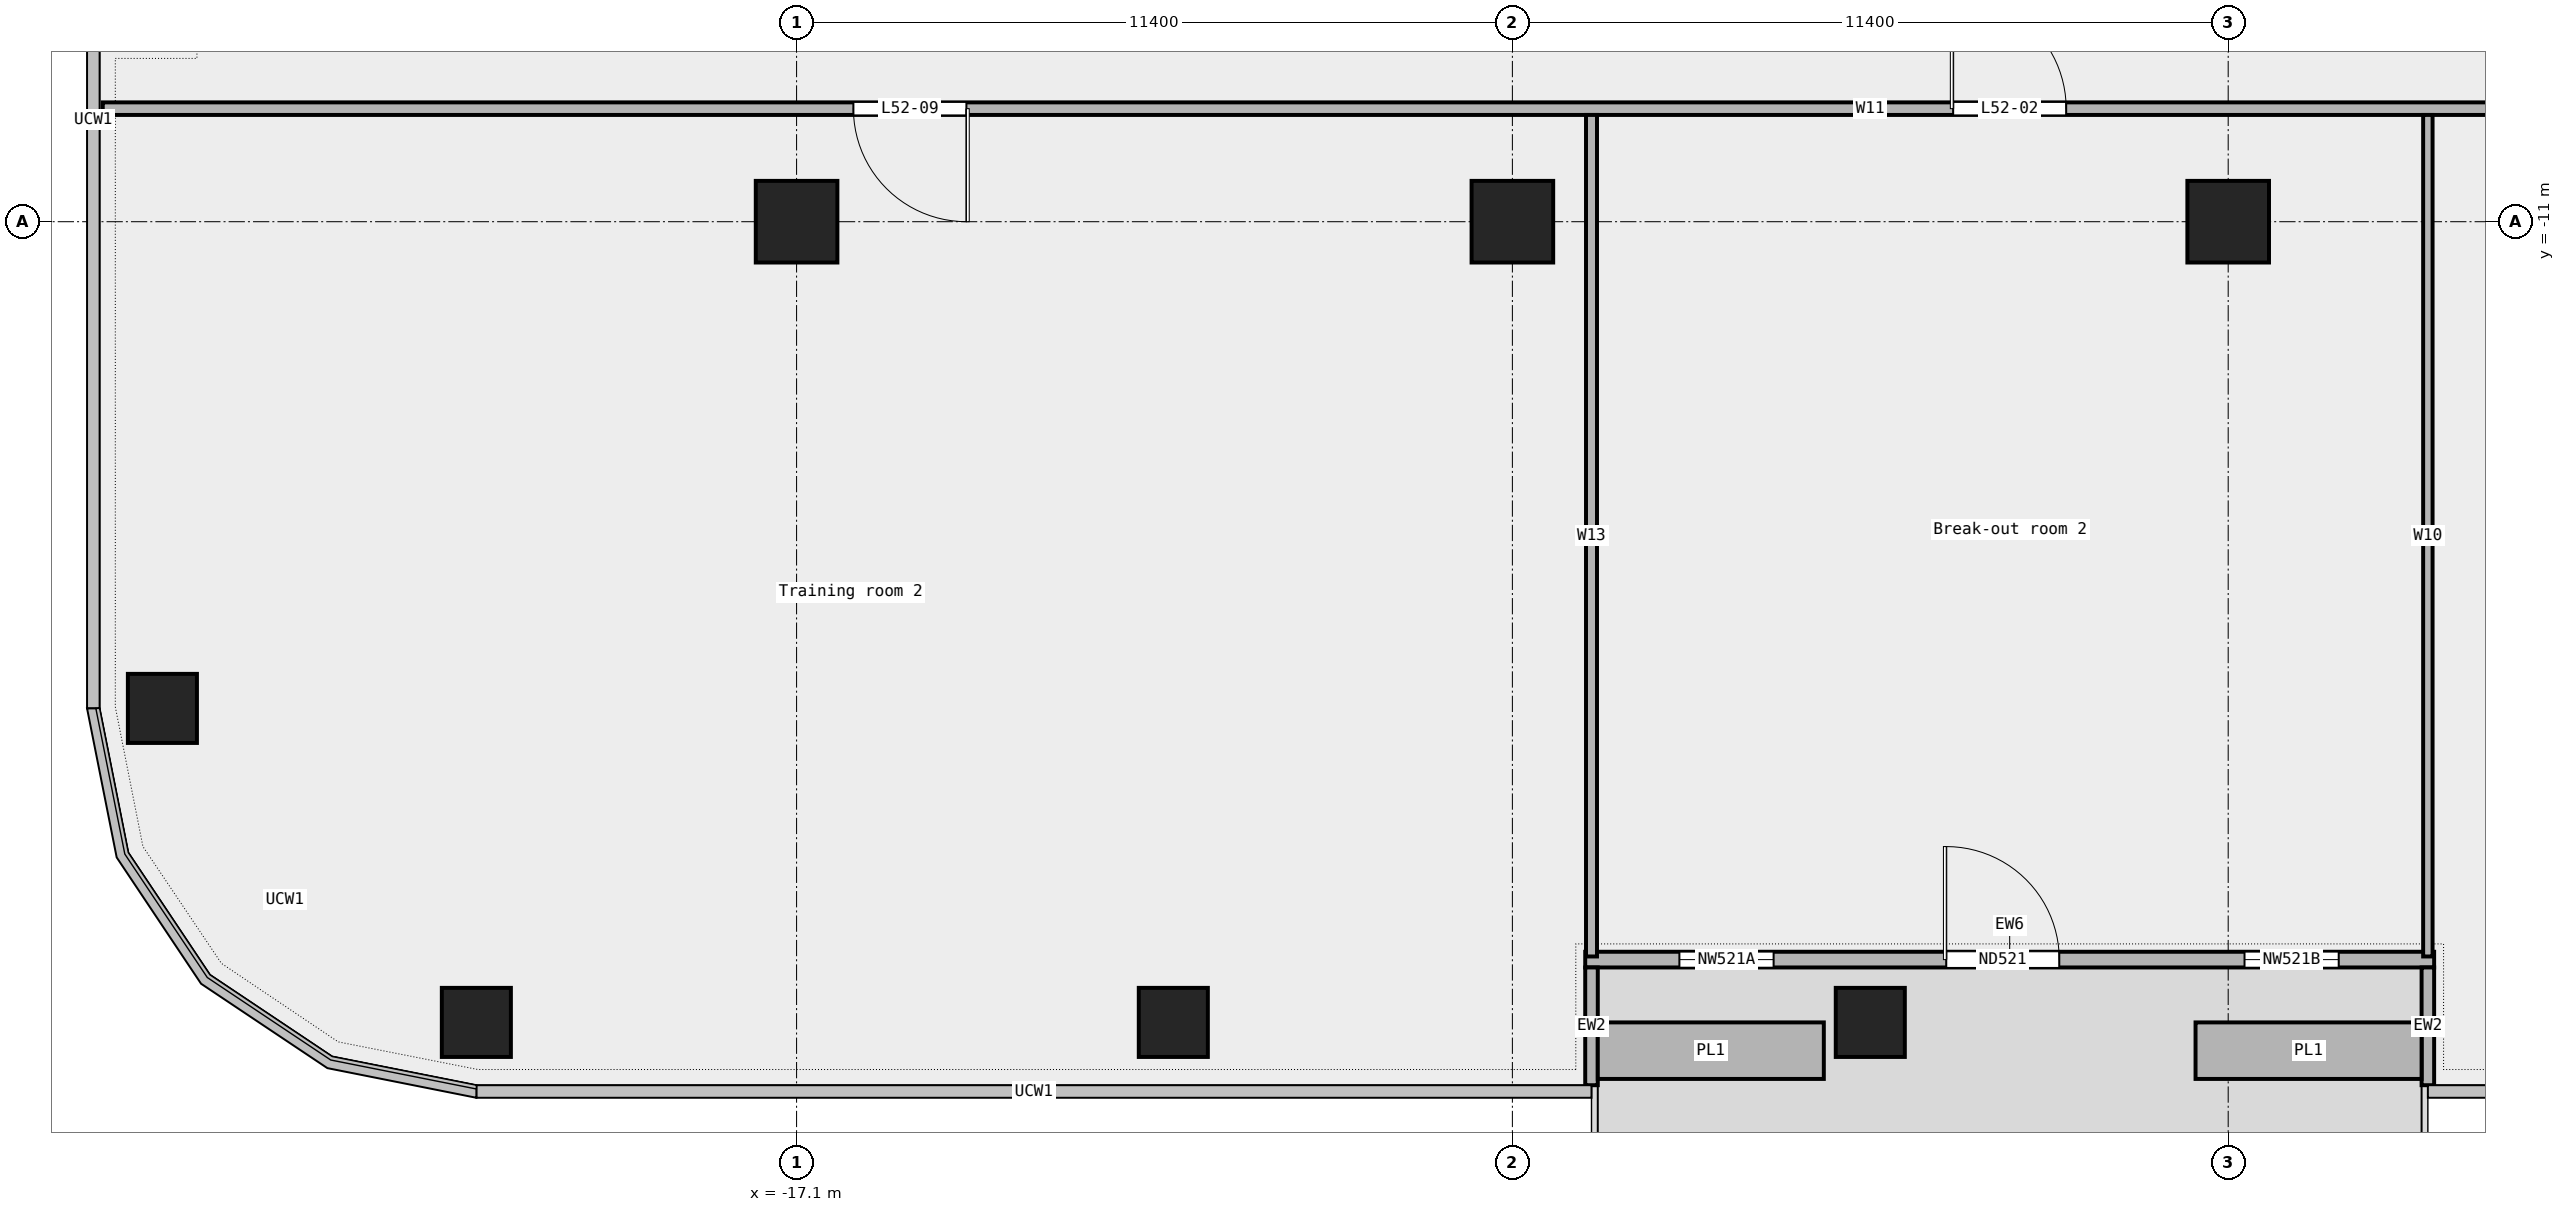
"""IFC4 building model, lengths in metres.
Left out: names, types, materials, properties, quantities, classifications, styles, units other than length and angle.
Written with IfcOpenShell. Run it as: python <this file> out.ifc"""

import sys

from ifc_helpers import new_model, si_unit, direction, frame, frame_2d, origin, origin_2d, place, context, subcontext, project, spatial, rectangle, extrude, element, fill, save


model = new_model("IFC4")
c1 = context("Model", 3, precision=1e-05, world=origin(), true_north=direction((0.0, 1.0)))
c2 = subcontext(c1, "Body", "Model", "MODEL_VIEW")
j1 = project(units=[si_unit("LENGTHUNIT", "METRE"), si_unit("PLANEANGLEUNIT", "RADIAN")], contexts=[c1])
p1 = place(None, origin())
s1 = spatial("IfcSite", under=j1, at=p1, CompositionType="ELEMENT")
p2 = place(p1, origin())
s2 = spatial("IfcBuilding", under=s1, at=p2, CompositionType="ELEMENT")
p3 = place(p2, frame((0.0, 0.0, 243.0)))
s3 = spatial("IfcBuildingStorey", under=s2, at=p3, CompositionType="ELEMENT", Elevation=243.0)
for number, where, z_axis, x_axis in (
    (1, (-22.2, -23.75, 0.0), (0.0, 0.0, 1.0), (1.0, 0.0, 0.0)),
    (2, (-11.1, -23.75, 0.0), (0.0, 0.0, 1.0), (1.0, 0.0, 0.0)),
    (3, (0.0, -23.75, 0.0), (0.0, 0.0, 1.0), (1.0, 0.0, 0.0)),
    (4, (-27.2, -18.75, 0.0), (0.0, 0.0, 1.0), (1.0, 0.0, 0.0)),
):
    element("IfcColumn", number, at=place(p3, frame(where, z_axis=z_axis, x_axis=x_axis)), inside=s3, PredefinedType="COLUMN", context=c2, shape_type="SweptSolid", body=[
        extrude(rectangle(XDim=1.1, YDim=1.1, at=origin_2d()), origin(), (0.0, 0.0, 1.0), 3.6),
    ])
for number, where, z_axis, x_axis in (
    (5, (-17.1, -11.0, 0.0), (0.0, 0.0, 1.0), (1.0, 0.0, 0.0)),
    (6, (-5.7, -11.0, 0.0), (0.0, 0.0, 1.0), (1.0, 0.0, 0.0)),
    (7, (5.7, -11.0, 0.0), (0.0, 0.0, 1.0), (1.0, 0.0, 0.0)),
):
    element("IfcColumn", number, at=place(p3, frame(where, z_axis=z_axis, x_axis=x_axis)), inside=s3, PredefinedType="COLUMN", context=c2, shape_type="SweptSolid", body=[
        extrude(rectangle(XDim=1.3, YDim=1.3, at=origin_2d()), origin(), (0.0, 0.0, 1.0), 3.6),
    ])
p4 = place(p3, frame((-4.54, -22.75, 0.0), z_axis=(0.0, 0.0, 1.0), x_axis=(1.0, 0.0, 0.0)))
e8 = element("IfcWall", 8, at=p4, inside=s3, PredefinedType="STANDARD", context=c2, shape_type="SweptSolid", body=[
    extrude(rectangle(XDim=13.52, YDim=0.25, at=frame_2d((6.76, 0.0))), origin(), (0.0, 0.0, 1.0), 3.6),
])
p5 = place(p4, frame((1.5, 0.0, 0.45)))
e9 = element("IfcOpeningElement", 9, at=p5, cuts=e8, PredefinedType="OPENING", context=c2, shape_type="SweptSolid", body=[
    extrude(rectangle(XDim=1.5, YDim=2.4, at=frame_2d((0.75, 1.2))), frame((0.0, 0.137, 0.0), z_axis=(0.0, -1.0, 0.0), x_axis=(1.0, 0.0, 0.0)), (0.0, 0.0, 1.0), 0.274),
])
p6 = place(p4, frame((5.75, 0.0, 0.0)))
e10 = element("IfcOpeningElement", 10, at=p6, cuts=e8, PredefinedType="OPENING", context=c2, shape_type="SweptSolid", body=[
    extrude(rectangle(XDim=1.8, YDim=2.4, at=frame_2d((0.9, 1.2))), frame((0.0, 0.137, 0.0), z_axis=(0.0, -1.0, 0.0), x_axis=(1.0, 0.0, 0.0)), (0.0, 0.0, 1.0), 0.274),
])
p7 = place(p4, frame((10.5, 0.0, 0.45)))
e11 = element("IfcOpeningElement", 11, at=p7, cuts=e8, PredefinedType="OPENING", context=c2, shape_type="SweptSolid", body=[
    extrude(rectangle(XDim=1.5, YDim=2.4, at=frame_2d((0.75, 1.2))), frame((0.0, 0.137, 0.0), z_axis=(0.0, -1.0, 0.0), x_axis=(1.0, 0.0, 0.0)), (0.0, 0.0, 1.0), 0.274),
])
for number, where, z_axis, x_axis in (
    (12, (-4.44, -24.75, 0.0), (0.0, 0.0, 1.0), (0.0, 1.0, 0.0)),
    (13, (8.88, -24.75, 0.0), (0.0, 0.0, 1.0), (0.0, 1.0, 0.0)),
):
    element("IfcWall", number, at=place(p3, frame(where, z_axis=z_axis, x_axis=x_axis)), inside=s3, PredefinedType="STANDARD", context=c2, shape_type="SweptSolid", body=[
        extrude(rectangle(XDim=1.875, YDim=0.2, at=frame_2d((0.938, 0.0))), origin(), (0.0, 0.0, 1.0), 3.6),
    ])
for number, where, z_axis, x_axis in (
    (14, (-4.34, -24.2, 0.0), (0.0, 0.0, 1.0), (1.0, 0.0, 0.0)),
    (15, (5.18, -24.2, 0.0), (0.0, 0.0, 1.0), (1.0, 0.0, 0.0)),
):
    element("IfcWall", number, at=place(p3, frame(where, z_axis=z_axis, x_axis=x_axis)), inside=s3, PredefinedType="STANDARD", context=c2, shape_type="SweptSolid", body=[
        extrude(rectangle(XDim=3.6, YDim=0.9, at=frame_2d((1.8, 0.0))), origin(), (0.0, 0.0, 1.0), 0.7),
    ])
p8 = place(p3, frame((-28.15, -9.2, 0.0), z_axis=(0.0, 0.0, 1.0), x_axis=(1.0, 0.0, 0.0)))
e16 = element("IfcWall", 16, at=p8, inside=s3, PredefinedType="PARTITIONING", context=c2, shape_type="SweptSolid", body=[
    extrude(rectangle(XDim=56.3, YDim=0.2, at=frame_2d((28.15, 0.0))), origin(), (0.0, 0.0, 1.0), 3.6),
])
p9 = place(p8, frame((29.47, 0.0, 0.0)))
e17 = element("IfcOpeningElement", 17, at=p9, cuts=e16, PredefinedType="OPENING", context=c2, shape_type="SweptSolid", body=[
    extrude(rectangle(XDim=1.8, YDim=2.1, at=frame_2d((0.9, 1.05))), frame((0.0, 0.112, 0.0), z_axis=(0.0, -1.0, 0.0), x_axis=(1.0, 0.0, 0.0)), (0.0, 0.0, 1.0), 0.224),
])
p10 = place(p8, frame((45.965, 0.0, 0.0)))
e18 = element("IfcOpeningElement", 18, at=p10, cuts=e16, PredefinedType="OPENING", context=c2, shape_type="SweptSolid", body=[
    extrude(rectangle(XDim=1.8, YDim=2.1, at=frame_2d((0.9, 1.05))), frame((0.0, 0.112, 0.0), z_axis=(0.0, -1.0, 0.0), x_axis=(1.0, 0.0, 0.0)), (0.0, 0.0, 1.0), 0.224),
])
p11 = place(p8, frame((11.955, 0.0, 0.0)))
e19 = element("IfcOpeningElement", 19, at=p11, cuts=e16, PredefinedType="OPENING", context=c2, shape_type="SweptSolid", body=[
    extrude(rectangle(XDim=1.8, YDim=2.1, at=frame_2d((0.9, 1.05))), frame((0.0, 0.112, 0.0), z_axis=(0.0, -1.0, 0.0), x_axis=(1.0, 0.0, 0.0)), (0.0, 0.0, 1.0), 0.224),
])
p12 = place(p3, frame((-4.44, -22.7, 0.0), z_axis=(0.0, 0.0, 1.0), x_axis=(0.0, 1.0, 0.0)))
e20 = element("IfcWall", 20, at=p12, inside=s3, PredefinedType="PARTITIONING", context=c2, shape_type="SweptSolid", body=[
    extrude(rectangle(XDim=13.4, YDim=0.175, at=frame_2d((6.7, 0.0))), origin(), (0.0, 0.0, 1.0), 3.6),
])
p13 = place(p3, frame((8.88, -22.7, 0.0), z_axis=(0.0, 0.0, 1.0), x_axis=(0.0, 1.0, 0.0)))
e21 = element("IfcWall", 21, at=p13, inside=s3, PredefinedType="PARTITIONING", context=c2, shape_type="SweptSolid", body=[
    extrude(rectangle(XDim=13.4, YDim=0.15, at=frame_2d((6.7, 0.0))), origin(), (0.0, 0.0, 1.0), 3.6),
])
p14 = place(p5, origin())
e22 = element("IfcWindow", 22, at=p14, inside=s3, PartitioningType="SINGLE_PANEL", PredefinedType="WINDOW", context=c2, shape_type="SweptSolid", body=[
    extrude(rectangle(XDim=1.5, YDim=2.4, at=frame_2d((0.75, 1.2))), frame((0.0, 0.03, 0.0), z_axis=(0.0, -1.0, 0.0), x_axis=(1.0, 0.0, 0.0)), (0.0, 0.0, 1.0), 0.06),
])
fill(e9, e22)
p15 = place(p6, origin())
e23 = element("IfcDoor", 23, at=p15, inside=s3, OperationType="DOUBLE_DOOR_SINGLE_SWING", PredefinedType="DOOR", context=c2, shape_type="SweptSolid", body=[
    extrude(rectangle(XDim=1.8, YDim=2.4, at=frame_2d((0.9, 1.2))), frame((0.0, 0.025, 0.0), z_axis=(0.0, -1.0, 0.0), x_axis=(1.0, 0.0, 0.0)), (0.0, 0.0, 1.0), 0.05),
])
fill(e10, e23)
p16 = place(p7, origin())
e24 = element("IfcWindow", 24, at=p16, inside=s3, PartitioningType="SINGLE_PANEL", PredefinedType="WINDOW", context=c2, shape_type="SweptSolid", body=[
    extrude(rectangle(XDim=1.5, YDim=2.4, at=frame_2d((0.75, 1.2))), frame((0.0, 0.03, 0.0), z_axis=(0.0, -1.0, 0.0), x_axis=(1.0, 0.0, 0.0)), (0.0, 0.0, 1.0), 0.06),
])
fill(e11, e24)
p17 = place(p9, origin())
e25 = element("IfcDoor", 25, at=p17, inside=s3, OperationType="DOUBLE_DOOR_SINGLE_SWING", PredefinedType="DOOR", context=c2, shape_type="SweptSolid", body=[
    extrude(rectangle(XDim=1.8, YDim=2.1, at=frame_2d((0.9, 1.05))), frame((0.0, 0.025, 0.0), z_axis=(0.0, -1.0, 0.0), x_axis=(1.0, 0.0, 0.0)), (0.0, 0.0, 1.0), 0.05),
])
fill(e17, e25)
p18 = place(p11, origin())
e26 = element("IfcDoor", 26, at=p18, inside=s3, OperationType="DOUBLE_DOOR_SINGLE_SWING", PredefinedType="DOOR", context=c2, shape_type="SweptSolid", body=[
    extrude(rectangle(XDim=1.8, YDim=2.1, at=frame_2d((0.9, 1.05))), frame((0.0, 0.025, 0.0), z_axis=(0.0, -1.0, 0.0), x_axis=(1.0, 0.0, 0.0)), (0.0, 0.0, 1.0), 0.05),
])
fill(e19, e26)
save(model, sys.argv[1])
